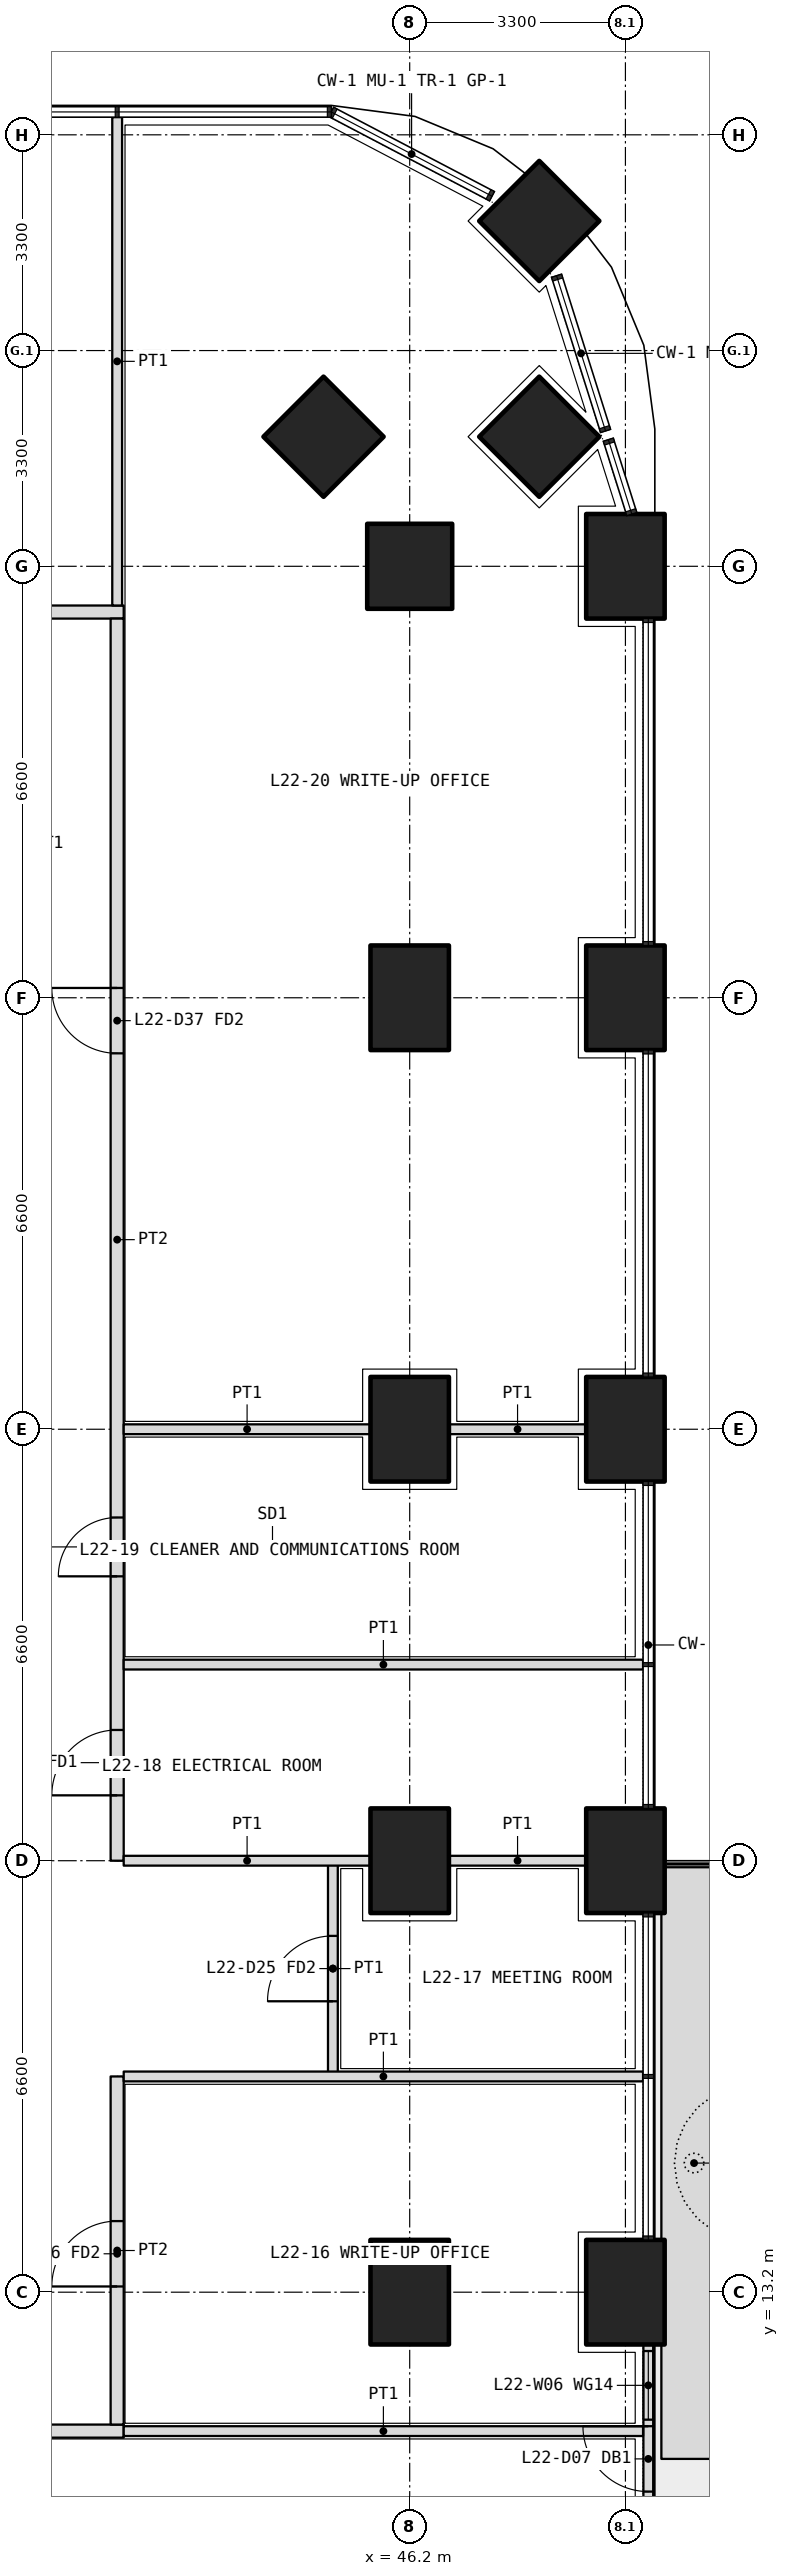
"""IFC4 building model, lengths in metres.
Left out: names, types, materials, properties, quantities, classifications, styles, units other than length and angle.
Written with IfcOpenShell. Run it as: python <this file> out.ifc"""

import sys

from ifc_helpers import new_model, si_unit, direction, frame, frame_2d, origin, origin_2d, place, context, subcontext, project, spatial, polyline, rectangle, outline, extrude, element, fill, save


model = new_model("IFC4")
c1 = context("Model", 3, precision=1e-05, world=origin(), true_north=direction((0.0, 1.0)))
c2 = subcontext(c1, "Body", "Model", "MODEL_VIEW")
j1 = project(units=[si_unit("LENGTHUNIT", "METRE"), si_unit("PLANEANGLEUNIT", "RADIAN")], contexts=[c1])
p1 = place(None, origin())
s1 = spatial("IfcSite", under=j1, at=p1, CompositionType="ELEMENT")
p2 = place(p1, origin())
s2 = spatial("IfcBuilding", under=s1, at=p2, CompositionType="ELEMENT")
p3 = place(p2, frame((0.0, 0.0, 99.0)))
s3 = spatial("IfcBuildingStorey", under=s2, at=p3, CompositionType="ELEMENT", Elevation=99.0)
p4 = place(p3, frame((48.182, 44.882, 0.0), z_axis=(0.0, 0.0, 1.0), x_axis=(0.707106781187, 0.707106781187, 0.0)))
e1 = element("IfcColumn", 1, at=p4, inside=s3, PredefinedType="COLUMN", context=c2, shape_type="SweptSolid", body=[
    extrude(rectangle(XDim=1.3, YDim=1.3, at=origin_2d()), origin(), (0.0, 0.0, 1.0), 4.2),
])
for number, where, z_axis, x_axis in (
    (2, (49.5, 13.2, 0.0), (0.0, 0.0, 1.0), (0.0, 1.0, 0.0)),
    (3, (49.5, 19.8, 0.0), (0.0, 0.0, 1.0), (0.0, 1.0, 0.0)),
    (4, (49.5, 26.4, 0.0), (0.0, 0.0, 1.0), (0.0, 1.0, 0.0)),
    (5, (49.5, 33.0, 0.0), (0.0, 0.0, 1.0), (0.0, 1.0, 0.0)),
    (6, (49.5, 39.6, 0.0), (0.0, 0.0, 1.0), (0.0, 1.0, 0.0)),
):
    element("IfcColumn", number, at=place(p3, frame(where, z_axis=z_axis, x_axis=x_axis)), inside=s3, PredefinedType="COLUMN", context=c2, shape_type="SweptSolid", body=[
        extrude(rectangle(XDim=1.6, YDim=1.2, at=origin_2d()), origin(), (0.0, 0.0, 1.0), 4.2),
    ])
for number, where, z_axis, x_axis in (
    (7, (46.2, 39.6, 0.0), (0.0, 0.0, 1.0), (1.0, 0.0, 0.0)),
    (8, (48.182, 41.582, 0.0), (0.0, 0.0, 1.0), (0.707, 0.707, 0.0)),
    (9, (44.882, 41.582, 0.0), (0.0, 0.0, 1.0), (0.707, 0.707, 0.0)),
):
    element("IfcColumn", number, at=place(p3, frame(where, z_axis=z_axis, x_axis=x_axis)), inside=s3, PredefinedType="COLUMN", context=c2, shape_type="SweptSolid", body=[
        extrude(rectangle(XDim=1.3, YDim=1.3, at=origin_2d()), origin(), (0.0, 0.0, 1.0), 4.2),
    ])
for number, where, z_axis, x_axis in (
    (10, (46.2, 13.2, 0.0), (0.0, 0.0, 1.0), (0.0, 1.0, 0.0)),
    (11, (46.2, 19.8, 0.0), (0.0, 0.0, 1.0), (0.0, 1.0, 0.0)),
    (12, (46.2, 26.4, 0.0), (0.0, 0.0, 1.0), (0.0, 1.0, 0.0)),
    (13, (46.2, 33.0, 0.0), (0.0, 0.0, 1.0), (0.0, 1.0, 0.0)),
):
    element("IfcColumn", number, at=place(p3, frame(where, z_axis=z_axis, x_axis=x_axis)), inside=s3, PredefinedType="COLUMN", context=c2, shape_type="SweptSolid", body=[
        extrude(rectangle(XDim=1.6, YDim=1.2, at=origin_2d()), origin(), (0.0, 0.0, 1.0), 4.2),
    ])
p5 = place(p3, origin())
e14 = element("IfcWall", 14, at=p5, inside=s3, PredefinedType="USERDEFINED", context=c2, shape_type="SweptSolid", body=[
    extrude(outline(polyline([(50.05, 10.65), (51.05, 10.65), (51.05, 19.7), (50.05, 19.7), (50.05, 10.65)]), holes=[polyline([(50.2, 10.8), (50.9, 10.8), (50.9, 19.55), (50.2, 19.55), (50.2, 10.8)])]), origin(), (0.0, 0.0, 1.0), 1.05),
])
p6 = place(p3, frame((49.85, 7.4, 0.0), z_axis=(0.0, 0.0, 1.0), x_axis=(0.0, 1.0, 0.0)))
e15 = element("IfcWall", 15, at=p6, inside=s3, PredefinedType="SOLIDWALL", context=c2, shape_type="SweptSolid", body=[
    extrude(rectangle(XDim=5.0, YDim=0.15, at=frame_2d((2.5, 0.0))), origin(), (0.0, 0.0, 1.0), 2.7),
])
p7 = place(p6, frame((2.75, 0.0, 0.0)))
e16 = element("IfcOpeningElement", 16, at=p7, cuts=e15, PredefinedType="OPENING", context=c2, shape_type="SweptSolid", body=[
    extrude(rectangle(XDim=1.0, YDim=2.4, at=frame_2d((0.5, 1.2))), frame((0.0, 0.085, 0.0), z_axis=(0.0, -1.0, 0.0), x_axis=(1.0, 0.0, 0.0)), (0.0, 0.0, 1.0), 0.17),
])
p8 = place(p6, frame((0.1, 0.0, 0.1)))
e17 = element("IfcOpeningElement", 17, at=p8, cuts=e15, PredefinedType="OPENING", context=c2, shape_type="SweptSolid", body=[
    extrude(rectangle(XDim=2.15, YDim=2.3, at=frame_2d((1.075, 1.15))), frame((0.0, 0.085, 0.0), z_axis=(0.0, -1.0, 0.0), x_axis=(1.0, 0.0, 0.0)), (0.0, 0.0, 1.0), 0.17),
])
p9 = place(p6, frame((3.85, 0.0, 0.1)))
e18 = element("IfcOpeningElement", 18, at=p9, cuts=e15, PredefinedType="OPENING", context=c2, shape_type="SweptSolid", body=[
    extrude(rectangle(XDim=1.05, YDim=2.3, at=frame_2d((0.525, 1.15))), frame((0.0, 0.085, 0.0), z_axis=(0.0, -1.0, 0.0), x_axis=(1.0, 0.0, 0.0)), (0.0, 0.0, 1.0), 0.17),
])
p10 = place(p3, frame((10.975, 11.075, 0.0), z_axis=(0.0, 0.0, 1.0), x_axis=(1.0, 0.0, 0.0)))
e19 = element("IfcWall", 19, at=p10, inside=s3, PredefinedType="PARTITIONING", context=c2, shape_type="SweptSolid", body=[
    extrude(rectangle(XDim=30.85, YDim=0.2, at=frame_2d((15.425, 0.0))), origin(), (0.0, 0.0, 1.0), 2.85),
])
p11 = place(p10, frame((0.663, 0.0, 0.0)))
e20 = element("IfcOpeningElement", 20, at=p11, cuts=e19, PredefinedType="OPENING", context=c2, shape_type="SweptSolid", body=[
    extrude(rectangle(XDim=1.0, YDim=2.1, at=frame_2d((0.5, 1.05))), frame((0.0, 0.11, 0.0), z_axis=(0.0, -1.0, 0.0), x_axis=(1.0, 0.0, 0.0)), (0.0, 0.0, 1.0), 0.22),
])
p12 = place(p10, frame((3.275, 0.0, 0.0)))
e21 = element("IfcOpeningElement", 21, at=p12, cuts=e19, PredefinedType="OPENING", context=c2, shape_type="SweptSolid", body=[
    extrude(rectangle(XDim=1.2, YDim=2.1, at=frame_2d((0.6, 1.05))), frame((0.0, 0.11, 0.0), z_axis=(0.0, -1.0, 0.0), x_axis=(1.0, 0.0, 0.0)), (0.0, 0.0, 1.0), 0.22),
])
p13 = place(p10, frame((8.325, 0.0, 0.0)))
e22 = element("IfcOpeningElement", 22, at=p13, cuts=e19, PredefinedType="OPENING", context=c2, shape_type="SweptSolid", body=[
    extrude(rectangle(XDim=1.0, YDim=2.1, at=frame_2d((0.5, 1.05))), frame((0.0, 0.11, 0.0), z_axis=(0.0, -1.0, 0.0), x_axis=(1.0, 0.0, 0.0)), (0.0, 0.0, 1.0), 0.22),
])
p14 = place(p10, frame((13.275, 0.0, 0.0)))
e23 = element("IfcOpeningElement", 23, at=p14, cuts=e19, PredefinedType="OPENING", context=c2, shape_type="SweptSolid", body=[
    extrude(rectangle(XDim=1.0, YDim=2.1, at=frame_2d((0.5, 1.05))), frame((0.0, 0.11, 0.0), z_axis=(0.0, -1.0, 0.0), x_axis=(1.0, 0.0, 0.0)), (0.0, 0.0, 1.0), 0.22),
])
p15 = place(p10, frame((17.025, 0.0, 0.0)))
e24 = element("IfcOpeningElement", 24, at=p15, cuts=e19, PredefinedType="OPENING", context=c2, shape_type="SweptSolid", body=[
    extrude(rectangle(XDim=1.0, YDim=2.1, at=frame_2d((0.5, 1.05))), frame((0.0, 0.11, 0.0), z_axis=(0.0, -1.0, 0.0), x_axis=(1.0, 0.0, 0.0)), (0.0, 0.0, 1.0), 0.22),
])
p16 = place(p10, frame((20.325, 0.0, 0.0)))
e25 = element("IfcOpeningElement", 25, at=p16, cuts=e19, PredefinedType="OPENING", context=c2, shape_type="SweptSolid", body=[
    extrude(rectangle(XDim=1.0, YDim=2.1, at=frame_2d((0.5, 1.05))), frame((0.0, 0.11, 0.0), z_axis=(0.0, -1.0, 0.0), x_axis=(1.0, 0.0, 0.0)), (0.0, 0.0, 1.0), 0.22),
])
p17 = place(p10, frame((25.887, 0.0, 0.0)))
e26 = element("IfcOpeningElement", 26, at=p17, cuts=e19, PredefinedType="OPENING", context=c2, shape_type="SweptSolid", body=[
    extrude(rectangle(XDim=1.0, YDim=2.1, at=frame_2d((0.5, 1.05))), frame((0.0, 0.11, 0.0), z_axis=(0.0, -1.0, 0.0), x_axis=(1.0, 0.0, 0.0)), (0.0, 0.0, 1.0), 0.22),
])
p18 = place(p3, frame((10.975, 38.9, 0.0), z_axis=(0.0, 0.0, 1.0), x_axis=(1.0, 0.0, 0.0)))
e27 = element("IfcWall", 27, at=p18, inside=s3, PredefinedType="PARTITIONING", context=c2, shape_type="SweptSolid", body=[
    extrude(rectangle(XDim=30.85, YDim=0.2, at=frame_2d((15.425, 0.0))), origin(), (0.0, 0.0, 1.0), 2.85),
])
p19 = place(p18, frame((5.613, 0.0, 0.0)))
e28 = element("IfcOpeningElement", 28, at=p19, cuts=e27, PredefinedType="OPENING", context=c2, shape_type="SweptSolid", body=[
    extrude(rectangle(XDim=1.0, YDim=2.1, at=frame_2d((0.5, 1.05))), frame((0.0, 0.11, 0.0), z_axis=(0.0, -1.0, 0.0), x_axis=(1.0, 0.0, 0.0)), (0.0, 0.0, 1.0), 0.22),
])
p20 = place(p18, frame((16.575, 0.0, 0.0)))
e29 = element("IfcOpeningElement", 29, at=p20, cuts=e27, PredefinedType="OPENING", context=c2, shape_type="SweptSolid", body=[
    extrude(rectangle(XDim=1.0, YDim=2.1, at=frame_2d((0.5, 1.05))), frame((0.0, 0.11, 0.0), z_axis=(0.0, -1.0, 0.0), x_axis=(1.0, 0.0, 0.0)), (0.0, 0.0, 1.0), 0.22),
])
p21 = place(p18, frame((23.175, 0.0, 0.0)))
e30 = element("IfcOpeningElement", 30, at=p21, cuts=e27, PredefinedType="OPENING", context=c2, shape_type="SweptSolid", body=[
    extrude(rectangle(XDim=1.0, YDim=2.1, at=frame_2d((0.5, 1.05))), frame((0.0, 0.11, 0.0), z_axis=(0.0, -1.0, 0.0), x_axis=(1.0, 0.0, 0.0)), (0.0, 0.0, 1.0), 0.22),
])
p22 = place(p18, frame((27.538, 0.0, 0.0)))
e31 = element("IfcOpeningElement", 31, at=p22, cuts=e27, PredefinedType="OPENING", context=c2, shape_type="SweptSolid", body=[
    extrude(rectangle(XDim=1.0, YDim=2.1, at=frame_2d((0.5, 1.05))), frame((0.0, 0.11, 0.0), z_axis=(0.0, -1.0, 0.0), x_axis=(1.0, 0.0, 0.0)), (0.0, 0.0, 1.0), 0.22),
])
p23 = place(p3, frame((41.725, 11.175, 0.0), z_axis=(0.0, 0.0, 1.0), x_axis=(0.0, 1.0, 0.0)))
e32 = element("IfcWall", 32, at=p23, inside=s3, PredefinedType="PARTITIONING", context=c2, shape_type="SweptSolid", body=[
    extrude(rectangle(XDim=5.325, YDim=0.2, at=frame_2d((2.663, 0.0))), origin(), (0.0, 0.0, 1.0), 2.85),
])
p24 = place(p23, frame((2.113, 0.0, 0.0)))
e33 = element("IfcOpeningElement", 33, at=p24, cuts=e32, PredefinedType="OPENING", context=c2, shape_type="SweptSolid", body=[
    extrude(rectangle(XDim=1.0, YDim=2.1, at=frame_2d((0.5, 1.05))), frame((0.0, 0.11, 0.0), z_axis=(0.0, -1.0, 0.0), x_axis=(1.0, 0.0, 0.0)), (0.0, 0.0, 1.0), 0.22),
])
p25 = place(p3, frame((41.725, 19.8, 0.0), z_axis=(0.0, 0.0, 1.0), x_axis=(0.0, 1.0, 0.0)))
e34 = element("IfcWall", 34, at=p25, inside=s3, PredefinedType="PARTITIONING", context=c2, shape_type="SweptSolid", body=[
    extrude(rectangle(XDim=19.0, YDim=0.2, at=frame_2d((9.5, 0.0))), origin(), (0.0, 0.0, 1.0), 2.85),
])
p26 = place(p25, frame((1.0, 0.0, 0.0)))
e35 = element("IfcOpeningElement", 35, at=p26, cuts=e34, PredefinedType="OPENING", context=c2, shape_type="SweptSolid", body=[
    extrude(rectangle(XDim=1.0, YDim=2.1, at=frame_2d((0.5, 1.05))), frame((0.0, 0.11, 0.0), z_axis=(0.0, -1.0, 0.0), x_axis=(1.0, 0.0, 0.0)), (0.0, 0.0, 1.0), 0.22),
])
p27 = place(p25, frame((4.35, 0.0, 0.0)))
e36 = element("IfcOpeningElement", 36, at=p27, cuts=e34, PredefinedType="OPENING", context=c2, shape_type="SweptSolid", body=[
    extrude(rectangle(XDim=0.9, YDim=2.1, at=frame_2d((0.45, 1.05))), frame((0.0, 0.11, 0.0), z_axis=(0.0, -1.0, 0.0), x_axis=(1.0, 0.0, 0.0)), (0.0, 0.0, 1.0), 0.22),
])
p28 = place(p25, frame((12.35, 0.0, 0.0)))
e37 = element("IfcOpeningElement", 37, at=p28, cuts=e34, PredefinedType="OPENING", context=c2, shape_type="SweptSolid", body=[
    extrude(rectangle(XDim=1.0, YDim=2.1, at=frame_2d((0.5, 1.05))), frame((0.0, 0.11, 0.0), z_axis=(0.0, -1.0, 0.0), x_axis=(1.0, 0.0, 0.0)), (0.0, 0.0, 1.0), 0.22),
])
p29 = place(p3, frame((49.77, 11.075, 0.0), z_axis=(0.0, 0.0, 1.0), x_axis=(-1.0, 0.0, 0.0)))
e38 = element("IfcWall", 38, at=p29, inside=s3, PredefinedType="PARTITIONING", context=c2, shape_type="SweptSolid", body=[
    extrude(rectangle(XDim=7.945, YDim=0.15, at=frame_2d((3.973, 0.0))), origin(), (0.0, 0.0, 1.0), 2.7),
])
p30 = place(p3, frame((41.725, 46.47, 0.0), z_axis=(0.0, 0.0, 1.0), x_axis=(0.0, -1.0, 0.0)))
e39 = element("IfcWall", 39, at=p30, inside=s3, PredefinedType="PARTITIONING", context=c2, shape_type="SweptSolid", body=[
    extrude(rectangle(XDim=7.47, YDim=0.15, at=frame_2d((3.735, 0.0))), origin(), (0.0, 0.0, 1.0), 2.7),
])
p31 = place(p3, frame((45.025, 16.5, 0.0), z_axis=(0.0, 0.0, 1.0), x_axis=(0.0, 1.0, 0.0)))
e40 = element("IfcWall", 40, at=p31, inside=s3, PredefinedType="PARTITIONING", context=c2, shape_type="SweptSolid", body=[
    extrude(rectangle(XDim=3.3, YDim=0.15, at=frame_2d((1.65, 0.0))), origin(), (0.0, 0.0, 1.0), 2.85),
])
p32 = place(p31, frame((1.15, 0.0, 0.0)))
e41 = element("IfcOpeningElement", 41, at=p32, cuts=e40, PredefinedType="OPENING", context=c2, shape_type="SweptSolid", body=[
    extrude(rectangle(XDim=1.0, YDim=2.1, at=frame_2d((0.5, 1.05))), frame((0.0, 0.085, 0.0), z_axis=(0.0, -1.0, 0.0), x_axis=(1.0, 0.0, 0.0)), (0.0, 0.0, 1.0), 0.17),
])
p33 = place(p3, frame((49.77, 22.8, 0.0), z_axis=(0.0, 0.0, 1.0), x_axis=(-1.0, 0.0, 0.0)))
e42 = element("IfcWall", 42, at=p33, inside=s3, PredefinedType="PARTITIONING", context=c2, shape_type="SweptSolid", body=[
    extrude(rectangle(XDim=7.945, YDim=0.15, at=frame_2d((3.973, 0.0))), origin(), (0.0, 0.0, 1.0), 2.7),
])
p34 = place(p3, frame((48.9, 26.4, 0.0), z_axis=(0.0, 0.0, 1.0), x_axis=(-1.0, 0.0, 0.0)))
e43 = element("IfcWall", 43, at=p34, inside=s3, PredefinedType="PARTITIONING", context=c2, shape_type="SweptSolid", body=[
    extrude(rectangle(XDim=2.1, YDim=0.15, at=frame_2d((1.05, 0.0))), origin(), (0.0, 0.0, 1.0), 2.85),
])
p35 = place(p3, frame((45.6, 26.4, 0.0), z_axis=(0.0, 0.0, 1.0), x_axis=(-1.0, 0.0, 0.0)))
e44 = element("IfcWall", 44, at=p35, inside=s3, PredefinedType="PARTITIONING", context=c2, shape_type="SweptSolid", body=[
    extrude(rectangle(XDim=3.775, YDim=0.15, at=frame_2d((1.888, 0.0))), origin(), (0.0, 0.0, 1.0), 2.85),
])
p36 = place(p3, frame((49.77, 16.5, 0.0), z_axis=(0.0, 0.0, 1.0), x_axis=(-1.0, 0.0, 0.0)))
e45 = element("IfcWall", 45, at=p36, inside=s3, PredefinedType="PARTITIONING", context=c2, shape_type="SweptSolid", body=[
    extrude(rectangle(XDim=7.945, YDim=0.15, at=frame_2d((3.973, 0.0))), origin(), (0.0, 0.0, 1.0), 2.7),
])
p37 = place(p3, frame((48.9, 19.8, 0.0), z_axis=(0.0, 0.0, 1.0), x_axis=(-1.0, 0.0, 0.0)))
e46 = element("IfcWall", 46, at=p37, inside=s3, PredefinedType="PARTITIONING", context=c2, shape_type="SweptSolid", body=[
    extrude(rectangle(XDim=2.1, YDim=0.15, at=frame_2d((1.05, 0.0))), origin(), (0.0, 0.0, 1.0), 2.85),
])
p38 = place(p3, frame((45.6, 19.8, 0.0), z_axis=(0.0, 0.0, 1.0), x_axis=(-1.0, 0.0, 0.0)))
e47 = element("IfcWall", 47, at=p38, inside=s3, PredefinedType="PARTITIONING", context=c2, shape_type="SweptSolid", body=[
    extrude(rectangle(XDim=3.775, YDim=0.15, at=frame_2d((1.888, 0.0))), origin(), (0.0, 0.0, 1.0), 2.85),
])
p39 = place(p7, origin())
e48 = element("IfcDoor", 48, at=p39, inside=s3, OperationType="SINGLE_SWING_RIGHT", PredefinedType="DOOR", context=c2, shape_type="SweptSolid", body=[
    extrude(rectangle(XDim=1.0, YDim=2.4, at=frame_2d((0.5, 1.2))), frame((0.0, 0.025, 0.0), z_axis=(0.0, -1.0, 0.0), x_axis=(1.0, 0.0, 0.0)), (0.0, 0.0, 1.0), 0.05),
])
fill(e16, e48)
p40 = place(p9, origin())
e49 = element("IfcWindow", 49, at=p40, inside=s3, PartitioningType="SINGLE_PANEL", PredefinedType="WINDOW", context=c2, shape_type="SweptSolid", body=[
    extrude(rectangle(XDim=1.05, YDim=2.3, at=frame_2d((0.525, 1.15))), frame((0.0, 0.03, 0.0), z_axis=(0.0, -1.0, 0.0), x_axis=(1.0, 0.0, 0.0)), (0.0, 0.0, 1.0), 0.06),
])
fill(e18, e49)
p41 = place(p24, origin())
e50 = element("IfcDoor", 50, at=p41, inside=s3, OperationType="SINGLE_SWING_LEFT", PredefinedType="DOOR", context=c2, shape_type="SweptSolid", body=[
    extrude(rectangle(XDim=1.0, YDim=2.1, at=frame_2d((0.5, 1.05))), frame((0.0, 0.025, 0.0), z_axis=(0.0, -1.0, 0.0), x_axis=(1.0, 0.0, 0.0)), (0.0, 0.0, 1.0), 0.05),
])
fill(e33, e50)
p42 = place(p32, origin())
e51 = element("IfcDoor", 51, at=p42, inside=s3, OperationType="SINGLE_SWING_LEFT", PredefinedType="DOOR", context=c2, shape_type="SweptSolid", body=[
    extrude(rectangle(XDim=1.0, YDim=2.1, at=frame_2d((0.5, 1.05))), frame((0.0, 0.025, 0.0), z_axis=(0.0, -1.0, 0.0), x_axis=(1.0, 0.0, 0.0)), (0.0, 0.0, 1.0), 0.05),
])
fill(e41, e51)
p43 = place(p26, origin())
e52 = element("IfcDoor", 52, at=p43, inside=s3, OperationType="SINGLE_SWING_LEFT", PredefinedType="DOOR", context=c2, shape_type="SweptSolid", body=[
    extrude(rectangle(XDim=1.0, YDim=2.1, at=frame_2d((0.5, 1.05))), frame((0.0, 0.025, 0.0), z_axis=(0.0, -1.0, 0.0), x_axis=(1.0, 0.0, 0.0)), (0.0, 0.0, 1.0), 0.05),
])
fill(e35, e52)
p44 = place(p27, origin())
e53 = element("IfcDoor", 53, at=p44, inside=s3, OperationType="SINGLE_SWING_LEFT", PredefinedType="DOOR", context=c2, shape_type="SweptSolid", body=[
    extrude(rectangle(XDim=0.9, YDim=2.1, at=frame_2d((0.45, 1.05))), frame((0.0, 0.025, 0.0), z_axis=(0.0, -1.0, 0.0), x_axis=(1.0, 0.0, 0.0)), (0.0, 0.0, 1.0), 0.05),
])
fill(e36, e53)
p45 = place(p28, origin())
e54 = element("IfcDoor", 54, at=p45, inside=s3, OperationType="SINGLE_SWING_RIGHT", PredefinedType="DOOR", context=c2, shape_type="SweptSolid", body=[
    extrude(rectangle(XDim=1.0, YDim=2.1, at=frame_2d((0.5, 1.05))), frame((0.0, 0.025, 0.0), z_axis=(0.0, -1.0, 0.0), x_axis=(1.0, 0.0, 0.0)), (0.0, 0.0, 1.0), 0.05),
])
fill(e37, e54)
save(model, sys.argv[1])
